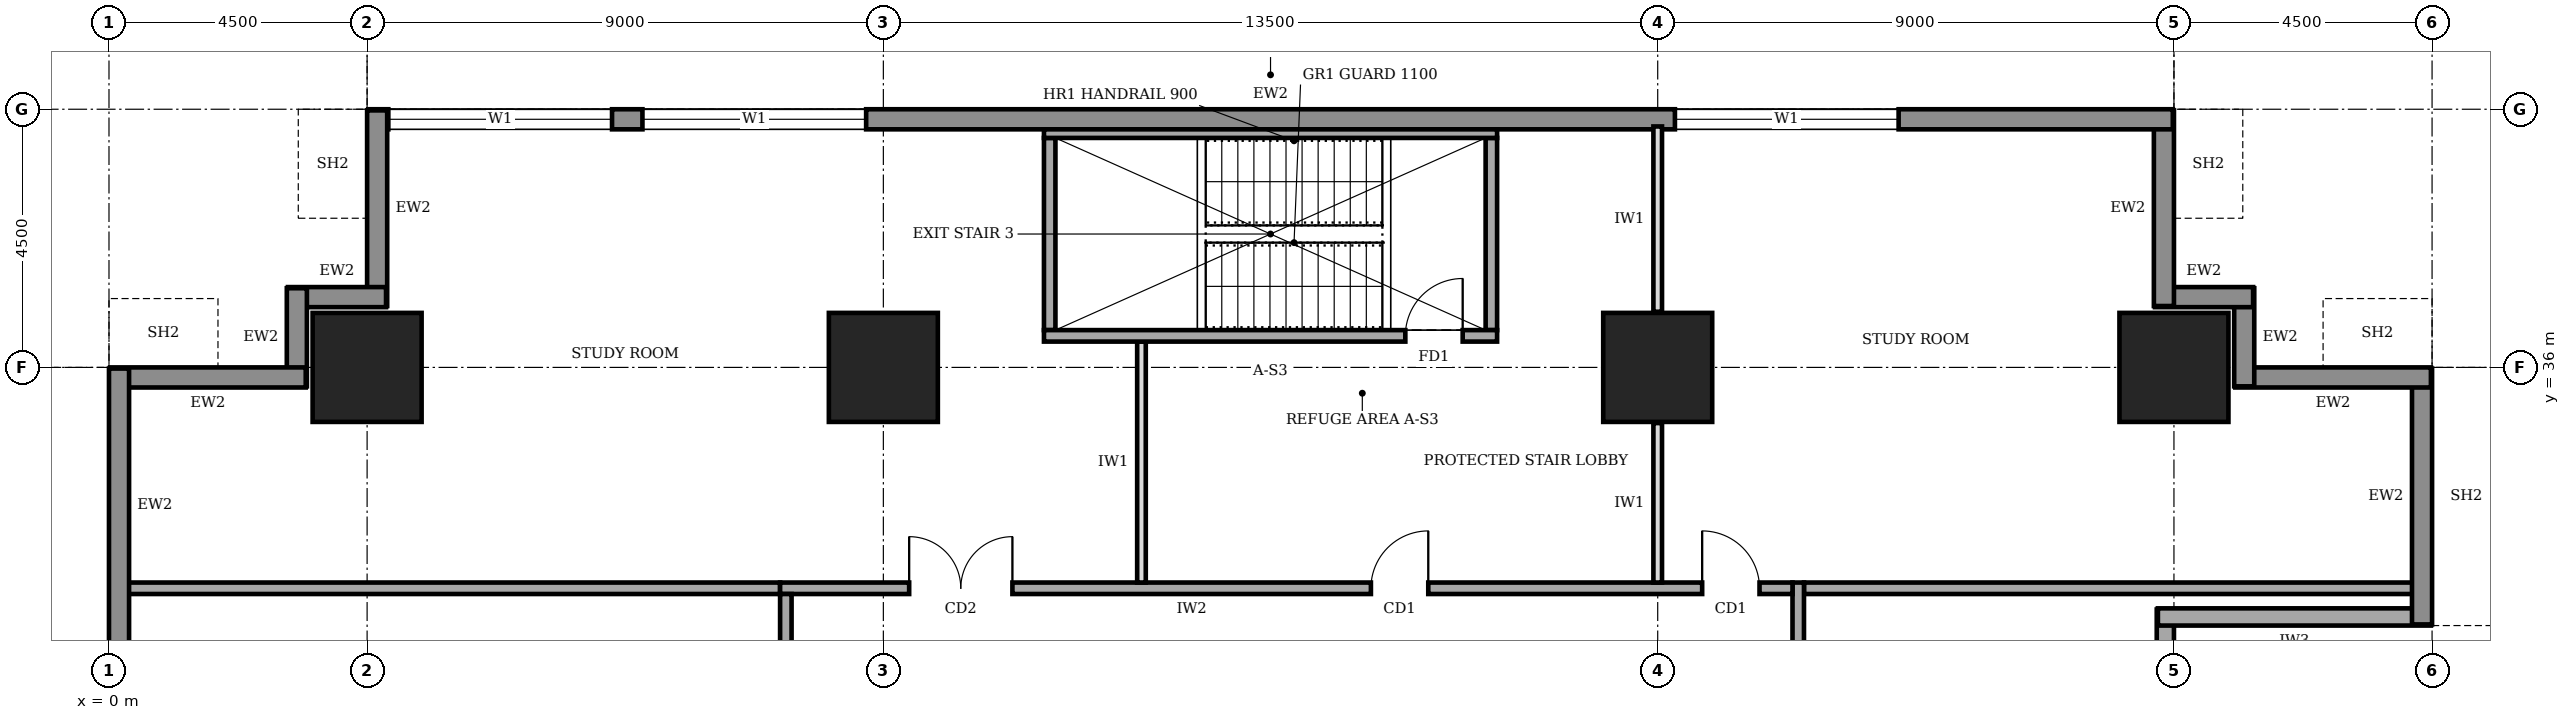
"""IFC4 building model, lengths in metres.
Left out: names, types, materials, properties, quantities, classifications, styles, units other than length and angle.
Written with IfcOpenShell. Run it as: python <this file> out.ifc"""

import sys

from ifc_helpers import new_model, si_unit, direction, frame, frame_2d, origin, origin_2d, place, context, subcontext, project, spatial, rectangle, extrude, element, fill, save


model = new_model("IFC4")
c1 = context("Model", 3, precision=1e-05, world=origin(), true_north=direction((0.0, 1.0)))
c2 = subcontext(c1, "Body", "Model", "MODEL_VIEW")
j1 = project(units=[si_unit("LENGTHUNIT", "METRE"), si_unit("PLANEANGLEUNIT", "RADIAN")], contexts=[c1])
p1 = place(None, origin())
s1 = spatial("IfcSite", under=j1, at=p1, CompositionType="ELEMENT")
p2 = place(p1, origin())
s2 = spatial("IfcBuilding", under=s1, at=p2, CompositionType="ELEMENT")
p3 = place(p2, frame((0.0, 0.0, 121.0)))
s3 = spatial("IfcBuildingStorey", under=s2, at=p3, CompositionType="ELEMENT", Elevation=121.0)
for number, where, z_axis, x_axis in (
    (1, (4.5, 36.0, 0.0), (0.0, 0.0, 1.0), (1.0, 0.0, 0.0)),
    (2, (13.5, 36.0, 0.0), (0.0, 0.0, 1.0), (1.0, 0.0, 0.0)),
    (3, (27.0, 36.0, 0.0), (0.0, 0.0, 1.0), (1.0, 0.0, 0.0)),
    (4, (36.0, 36.0, 0.0), (0.0, 0.0, 1.0), (1.0, 0.0, 0.0)),
):
    element("IfcColumn", number, at=place(p3, frame(where, z_axis=z_axis, x_axis=x_axis)), inside=s3, PredefinedType="COLUMN", context=c2, shape_type="SweptSolid", body=[
        extrude(rectangle(XDim=1.9, YDim=1.9, at=origin_2d()), origin(), (0.0, 0.0, 1.0), 4.0),
    ])
p4 = place(p3, frame((35.85, 30.4, 0.0), z_axis=(0.0, 0.0, 1.0), x_axis=(0.0, 1.0, 0.0)))
e5 = element("IfcWall", 5, at=p4, inside=s3, PredefinedType="SOLIDWALL", context=c2, shape_type="SweptSolid", body=[
    extrude(rectangle(XDim=1.38, YDim=0.3, at=frame_2d((0.69, 0.0))), origin(), (0.0, 0.0, 1.0), 2.65),
])
p5 = place(p3, frame((35.72, 31.65, 0.0), z_axis=(0.0, 0.0, 1.0), x_axis=(1.0, 0.0, 0.0)))
e6 = element("IfcWall", 6, at=p5, inside=s3, PredefinedType="SOLIDWALL", context=c2, shape_type="SweptSolid", body=[
    extrude(rectangle(XDim=4.76, YDim=0.3, at=frame_2d((2.38, 0.0))), origin(), (0.0, 0.0, 1.0), 3.75),
])
p6 = place(p3, frame((40.325, 31.52, 0.0), z_axis=(0.0, 0.0, 1.0), x_axis=(0.0, 1.0, 0.0)))
e7 = element("IfcWall", 7, at=p6, inside=s3, PredefinedType="STANDARD", context=c2, shape_type="SweptSolid", body=[
    extrude(rectangle(XDim=4.46, YDim=0.35, at=frame_2d((2.23, 0.0))), origin(), (0.0, 0.0, 1.0), 3.75),
])
p7 = place(p3, frame((40.48, 35.825, 0.0), z_axis=(0.0, 0.0, 1.0), x_axis=(-1.0, 0.0, 0.0)))
e8 = element("IfcWall", 8, at=p7, inside=s3, PredefinedType="STANDARD", context=c2, shape_type="SweptSolid", body=[
    extrude(rectangle(XDim=3.41, YDim=0.35, at=frame_2d((1.705, 0.0))), origin(), (0.0, 0.0, 1.0), 2.85),
])
for number, where, z_axis, x_axis in (
    (9, (37.225, 35.67, 0.0), (0.0, 0.0, 1.0), (0.0, 1.0, 0.0)),
    (10, (37.38, 37.225, 0.0), (0.0, 0.0, 1.0), (-1.0, 0.0, 0.0)),
):
    element("IfcWall", number, at=place(p3, frame(where, z_axis=z_axis, x_axis=x_axis)), inside=s3, PredefinedType="STANDARD", context=c2, shape_type="SweptSolid", body=[
        extrude(rectangle(XDim=1.71, YDim=0.35, at=frame_2d((0.855, 0.0))), origin(), (0.0, 0.0, 1.0), 3.75),
    ])
p8 = place(p3, frame((35.825, 37.07, 0.0), z_axis=(0.0, 0.0, 1.0), x_axis=(0.0, 1.0, 0.0)))
e11 = element("IfcWall", 11, at=p8, inside=s3, PredefinedType="STANDARD", context=c2, shape_type="SweptSolid", body=[
    extrude(rectangle(XDim=3.41, YDim=0.35, at=frame_2d((1.705, 0.0))), origin(), (0.0, 0.0, 1.0), 2.85),
])
p9 = place(p3, frame((35.98, 40.325, 0.0), z_axis=(0.0, 0.0, 1.0), x_axis=(-1.0, 0.0, 0.0)))
e12 = element("IfcWall", 12, at=p9, inside=s3, PredefinedType="STANDARD", context=c2, shape_type="SweptSolid", body=[
    extrude(rectangle(XDim=31.46, YDim=0.35, at=frame_2d((15.73, 0.0))), origin(), (0.0, 0.0, 1.0), 3.75),
])
p10 = place(p9, frame((27.21, 0.0, 0.9)))
e13 = element("IfcOpeningElement", 13, at=p10, cuts=e12, PredefinedType="OPENING", context=c2, shape_type="SweptSolid", body=[
    extrude(rectangle(XDim=3.9, YDim=2.2, at=frame_2d((1.95, 1.1))), frame((0.0, 0.185, 0.0), z_axis=(0.0, -1.0, 0.0), x_axis=(1.0, 0.0, 0.0)), (0.0, 0.0, 1.0), 0.37),
])
p11 = place(p9, frame((22.78, 0.0, 0.9)))
e14 = element("IfcOpeningElement", 14, at=p11, cuts=e12, PredefinedType="OPENING", context=c2, shape_type="SweptSolid", body=[
    extrude(rectangle(XDim=3.9, YDim=2.2, at=frame_2d((1.95, 1.1))), frame((0.0, 0.185, 0.0), z_axis=(0.0, -1.0, 0.0), x_axis=(1.0, 0.0, 0.0)), (0.0, 0.0, 1.0), 0.37),
])
p12 = place(p9, frame((4.78, 0.0, 0.9)))
e15 = element("IfcOpeningElement", 15, at=p12, cuts=e12, PredefinedType="OPENING", context=c2, shape_type="SweptSolid", body=[
    extrude(rectangle(XDim=3.9, YDim=2.2, at=frame_2d((1.95, 1.1))), frame((0.0, 0.185, 0.0), z_axis=(0.0, -1.0, 0.0), x_axis=(1.0, 0.0, 0.0)), (0.0, 0.0, 1.0), 0.37),
])
p13 = place(p3, frame((4.675, 40.48, 0.0), z_axis=(0.0, 0.0, 1.0), x_axis=(0.0, -1.0, 0.0)))
e16 = element("IfcWall", 16, at=p13, inside=s3, PredefinedType="STANDARD", context=c2, shape_type="SweptSolid", body=[
    extrude(rectangle(XDim=3.41, YDim=0.35, at=frame_2d((1.705, 0.0))), origin(), (0.0, 0.0, 1.0), 2.85),
])
for number, where, z_axis, x_axis in (
    (17, (4.83, 37.225, 0.0), (0.0, 0.0, 1.0), (-1.0, 0.0, 0.0)),
    (18, (3.275, 37.38, 0.0), (0.0, 0.0, 1.0), (0.0, -1.0, 0.0)),
):
    element("IfcWall", number, at=place(p3, frame(where, z_axis=z_axis, x_axis=x_axis)), inside=s3, PredefinedType="STANDARD", context=c2, shape_type="SweptSolid", body=[
        extrude(rectangle(XDim=1.71, YDim=0.35, at=frame_2d((0.855, 0.0))), origin(), (0.0, 0.0, 1.0), 3.75),
    ])
p14 = place(p3, frame((3.43, 35.825, 0.0), z_axis=(0.0, 0.0, 1.0), x_axis=(-1.0, 0.0, 0.0)))
e19 = element("IfcWall", 19, at=p14, inside=s3, PredefinedType="STANDARD", context=c2, shape_type="SweptSolid", body=[
    extrude(rectangle(XDim=3.41, YDim=0.35, at=frame_2d((1.705, 0.0))), origin(), (0.0, 0.0, 1.0), 2.85),
])
p15 = place(p3, frame((0.175, 35.98, 0.0), z_axis=(0.0, 0.0, 1.0), x_axis=(0.0, -1.0, 0.0)))
e20 = element("IfcWall", 20, at=p15, inside=s3, PredefinedType="STANDARD", context=c2, shape_type="SweptSolid", body=[
    extrude(rectangle(XDim=31.46, YDim=0.35, at=frame_2d((15.73, 0.0))), origin(), (0.0, 0.0, 1.0), 3.75),
])
p16 = place(p15, frame((27.21, 0.0, 0.9)))
e21 = element("IfcOpeningElement", 21, at=p16, cuts=e20, PredefinedType="OPENING", context=c2, shape_type="SweptSolid", body=[
    extrude(rectangle(XDim=3.9, YDim=2.2, at=frame_2d((1.95, 1.1))), frame((0.0, 0.185, 0.0), z_axis=(0.0, -1.0, 0.0), x_axis=(1.0, 0.0, 0.0)), (0.0, 0.0, 1.0), 0.37),
])
p17 = place(p15, frame((22.78, 0.0, 0.9)))
e22 = element("IfcOpeningElement", 22, at=p17, cuts=e20, PredefinedType="OPENING", context=c2, shape_type="SweptSolid", body=[
    extrude(rectangle(XDim=3.9, YDim=2.2, at=frame_2d((1.95, 1.1))), frame((0.0, 0.185, 0.0), z_axis=(0.0, -1.0, 0.0), x_axis=(1.0, 0.0, 0.0)), (0.0, 0.0, 1.0), 0.37),
])
p18 = place(p15, frame((18.28, 0.0, 0.9)))
e23 = element("IfcOpeningElement", 23, at=p18, cuts=e20, PredefinedType="OPENING", context=c2, shape_type="SweptSolid", body=[
    extrude(rectangle(XDim=3.9, YDim=2.2, at=frame_2d((1.95, 1.1))), frame((0.0, 0.185, 0.0), z_axis=(0.0, -1.0, 0.0), x_axis=(1.0, 0.0, 0.0)), (0.0, 0.0, 1.0), 0.37),
])
p19 = place(p15, frame((13.78, 0.0, 0.9)))
e24 = element("IfcOpeningElement", 24, at=p19, cuts=e20, PredefinedType="OPENING", context=c2, shape_type="SweptSolid", body=[
    extrude(rectangle(XDim=3.9, YDim=2.2, at=frame_2d((1.95, 1.1))), frame((0.0, 0.185, 0.0), z_axis=(0.0, -1.0, 0.0), x_axis=(1.0, 0.0, 0.0)), (0.0, 0.0, 1.0), 0.37),
])
p20 = place(p15, frame((9.28, 0.0, 0.9)))
e25 = element("IfcOpeningElement", 25, at=p20, cuts=e20, PredefinedType="OPENING", context=c2, shape_type="SweptSolid", body=[
    extrude(rectangle(XDim=3.9, YDim=2.2, at=frame_2d((1.95, 1.1))), frame((0.0, 0.185, 0.0), z_axis=(0.0, -1.0, 0.0), x_axis=(1.0, 0.0, 0.0)), (0.0, 0.0, 1.0), 0.37),
])
p21 = place(p15, frame((4.78, 0.0, 0.9)))
e26 = element("IfcOpeningElement", 26, at=p21, cuts=e20, PredefinedType="OPENING", context=c2, shape_type="SweptSolid", body=[
    extrude(rectangle(XDim=3.9, YDim=2.2, at=frame_2d((1.95, 1.1))), frame((0.0, 0.185, 0.0), z_axis=(0.0, -1.0, 0.0), x_axis=(1.0, 0.0, 0.0)), (0.0, 0.0, 1.0), 0.37),
])
p22 = place(p3, frame((29.45, 9.2, 0.0), z_axis=(0.0, 0.0, 1.0), x_axis=(0.0, 1.0, 0.0)))
e27 = element("IfcWall", 27, at=p22, inside=s3, PredefinedType="SOLIDWALL", context=c2, shape_type="SweptSolid", body=[
    extrude(rectangle(XDim=23.05, YDim=0.2, at=frame_2d((11.525, 0.0))), origin(), (0.0, 0.0, 1.0), 3.75),
])
p23 = place(p22, frame((10.525, 0.0, 0.0)))
e28 = element("IfcOpeningElement", 28, at=p23, cuts=e27, PredefinedType="OPENING", context=c2, shape_type="SweptSolid", body=[
    extrude(rectangle(XDim=1.8, YDim=2.1, at=frame_2d((0.9, 1.05))), frame((0.0, 0.11, 0.0), z_axis=(0.0, -1.0, 0.0), x_axis=(1.0, 0.0, 0.0)), (0.0, 0.0, 1.0), 0.22),
])
p24 = place(p3, frame((29.35, 32.15, 0.0), z_axis=(0.0, 0.0, 1.0), x_axis=(-1.0, 0.0, 0.0)))
e29 = element("IfcWall", 29, at=p24, inside=s3, PredefinedType="SOLIDWALL", context=c2, shape_type="SweptSolid", body=[
    extrude(rectangle(XDim=17.65, YDim=0.2, at=frame_2d((8.825, 0.0))), origin(), (0.0, 0.0, 1.0), 3.75),
])
p25 = place(p24, frame((13.6, 0.0, 0.0)))
e30 = element("IfcOpeningElement", 30, at=p25, cuts=e29, PredefinedType="OPENING", context=c2, shape_type="SweptSolid", body=[
    extrude(rectangle(XDim=1.8, YDim=2.1, at=frame_2d((0.9, 1.05))), frame((0.0, 0.11, 0.0), z_axis=(0.0, -1.0, 0.0), x_axis=(1.0, 0.0, 0.0)), (0.0, 0.0, 1.0), 0.22),
])
p26 = place(p24, frame((6.35, 0.0, 0.0)))
e31 = element("IfcOpeningElement", 31, at=p26, cuts=e29, PredefinedType="OPENING", context=c2, shape_type="SweptSolid", body=[
    extrude(rectangle(XDim=1.0, YDim=2.1, at=frame_2d((0.5, 1.05))), frame((0.0, 0.11, 0.0), z_axis=(0.0, -1.0, 0.0), x_axis=(1.0, 0.0, 0.0)), (0.0, 0.0, 1.0), 0.22),
])
p27 = place(p24, frame((0.575, 0.0, 0.0)))
e32 = element("IfcOpeningElement", 32, at=p27, cuts=e29, PredefinedType="OPENING", context=c2, shape_type="SweptSolid", body=[
    extrude(rectangle(XDim=1.0, YDim=2.1, at=frame_2d((0.5, 1.05))), frame((0.0, 0.11, 0.0), z_axis=(0.0, -1.0, 0.0), x_axis=(1.0, 0.0, 0.0)), (0.0, 0.0, 1.0), 0.22),
])
p28 = place(p3, frame((11.8, 32.05, 0.0), z_axis=(0.0, 0.0, 1.0), x_axis=(0.0, -1.0, 0.0)))
e33 = element("IfcWall", 33, at=p28, inside=s3, PredefinedType="SOLIDWALL", context=c2, shape_type="SweptSolid", body=[
    extrude(rectangle(XDim=23.05, YDim=0.2, at=frame_2d((11.525, 0.0))), origin(), (0.0, 0.0, 1.0), 3.75),
])
p29 = place(p28, frame((20.3, 0.0, 0.0)))
e34 = element("IfcOpeningElement", 34, at=p29, cuts=e33, PredefinedType="OPENING", context=c2, shape_type="SweptSolid", body=[
    extrude(rectangle(XDim=1.0, YDim=2.1, at=frame_2d((0.5, 1.05))), frame((0.0, 0.11, 0.0), z_axis=(0.0, -1.0, 0.0), x_axis=(1.0, 0.0, 0.0)), (0.0, 0.0, 1.0), 0.22),
])
p30 = place(p28, frame((16.4, 0.0, 0.0)))
e35 = element("IfcOpeningElement", 35, at=p30, cuts=e33, PredefinedType="OPENING", context=c2, shape_type="SweptSolid", body=[
    extrude(rectangle(XDim=0.9, YDim=2.1, at=frame_2d((0.45, 1.05))), frame((0.0, 0.11, 0.0), z_axis=(0.0, -1.0, 0.0), x_axis=(1.0, 0.0, 0.0)), (0.0, 0.0, 1.0), 0.22),
])
p31 = place(p28, frame((11.6, 0.0, 0.0)))
e36 = element("IfcOpeningElement", 36, at=p31, cuts=e33, PredefinedType="OPENING", context=c2, shape_type="SweptSolid", body=[
    extrude(rectangle(XDim=0.9, YDim=2.1, at=frame_2d((0.45, 1.05))), frame((0.0, 0.11, 0.0), z_axis=(0.0, -1.0, 0.0), x_axis=(1.0, 0.0, 0.0)), (0.0, 0.0, 1.0), 0.22),
])
p32 = place(p28, frame((8.55, 0.0, 0.0)))
e37 = element("IfcOpeningElement", 37, at=p32, cuts=e33, PredefinedType="OPENING", context=c2, shape_type="SweptSolid", body=[
    extrude(rectangle(XDim=0.9, YDim=2.1, at=frame_2d((0.45, 1.05))), frame((0.0, 0.11, 0.0), z_axis=(0.0, -1.0, 0.0), x_axis=(1.0, 0.0, 0.0)), (0.0, 0.0, 1.0), 0.22),
])
p33 = place(p28, frame((5.55, 0.0, 0.0)))
e38 = element("IfcOpeningElement", 38, at=p33, cuts=e33, PredefinedType="OPENING", context=c2, shape_type="SweptSolid", body=[
    extrude(rectangle(XDim=1.0, YDim=2.1, at=frame_2d((0.5, 1.05))), frame((0.0, 0.11, 0.0), z_axis=(0.0, -1.0, 0.0), x_axis=(1.0, 0.0, 0.0)), (0.0, 0.0, 1.0), 0.22),
])
p34 = place(p28, frame((13.65, 0.0, 0.0)))
e39 = element("IfcOpeningElement", 39, at=p34, cuts=e33, PredefinedType="OPENING", context=c2, shape_type="SweptSolid", body=[
    extrude(rectangle(XDim=1.0, YDim=2.1, at=frame_2d((0.5, 1.05))), frame((0.0, 0.11, 0.0), z_axis=(0.0, -1.0, 0.0), x_axis=(1.0, 0.0, 0.0)), (0.0, 0.0, 1.0), 0.22),
])
p35 = place(p28, frame((1.925, 0.0, 0.0)))
e40 = element("IfcOpeningElement", 40, at=p35, cuts=e33, PredefinedType="OPENING", context=c2, shape_type="SweptSolid", body=[
    extrude(rectangle(XDim=1.0, YDim=2.1, at=frame_2d((0.5, 1.05))), frame((0.0, 0.11, 0.0), z_axis=(0.0, -1.0, 0.0), x_axis=(1.0, 0.0, 0.0)), (0.0, 0.0, 1.0), 0.22),
])
p36 = place(p3, frame((0.3, 32.15, 0.0), z_axis=(0.0, 0.0, 1.0), x_axis=(1.0, 0.0, 0.0)))
e41 = element("IfcWall", 41, at=p36, inside=s3, PredefinedType="SOLIDWALL", context=c2, shape_type="SweptSolid", body=[
    extrude(rectangle(XDim=11.4, YDim=0.2, at=frame_2d((5.7, 0.0))), origin(), (0.0, 0.0, 1.0), 3.75),
])
p37 = place(p3, frame((29.55, 32.15, 0.0), z_axis=(0.0, 0.0, 1.0), x_axis=(1.0, 0.0, 0.0)))
e42 = element("IfcWall", 42, at=p37, inside=s3, PredefinedType="SOLIDWALL", context=c2, shape_type="SweptSolid", body=[
    extrude(rectangle(XDim=10.65, YDim=0.2, at=frame_2d((5.325, 0.0))), origin(), (0.0, 0.0, 1.0), 3.75),
])
p38 = place(p3, frame((18.0, 32.25, 0.0), z_axis=(0.0, 0.0, 1.0), x_axis=(0.0, 1.0, 0.0)))
e43 = element("IfcWall", 43, at=p38, inside=s3, PredefinedType="PARTITIONING", context=c2, shape_type="SweptSolid", body=[
    extrude(rectangle(XDim=4.2, YDim=0.15, at=frame_2d((2.1, 0.0))), origin(), (0.0, 0.0, 1.0), 3.75),
])
p39 = place(p3, frame((27.0, 32.25, 0.0), z_axis=(0.0, 0.0, 1.0), x_axis=(0.0, 1.0, 0.0)))
e44 = element("IfcWall", 44, at=p39, inside=s3, PredefinedType="PARTITIONING", context=c2, shape_type="SweptSolid", body=[
    extrude(rectangle(XDim=2.78, YDim=0.15, at=frame_2d((1.39, 0.0))), origin(), (0.0, 0.0, 1.0), 2.85),
])
p40 = place(p3, frame((27.0, 36.97, 0.0), z_axis=(0.0, 0.0, 1.0), x_axis=(0.0, 1.0, 0.0)))
e45 = element("IfcWall", 45, at=p40, inside=s3, PredefinedType="PARTITIONING", context=c2, shape_type="SweptSolid", body=[
    extrude(rectangle(XDim=3.23, YDim=0.15, at=frame_2d((1.615, 0.0))), origin(), (0.0, 0.0, 1.0), 2.85),
])
p41 = place(p3, frame((16.3, 36.55, 0.0), z_axis=(0.0, 0.0, 1.0), x_axis=(1.0, 0.0, 0.0)))
e46 = element("IfcWall", 46, at=p41, inside=s3, PredefinedType="SOLIDWALL", context=c2, shape_type="SweptSolid", body=[
    extrude(rectangle(XDim=7.9, YDim=0.2, at=frame_2d((3.95, 0.0))), origin(), (0.0, 0.0, 1.0), 3.75),
])
p42 = place(p41, frame((6.3, 0.0, 0.0)))
e47 = element("IfcOpeningElement", 47, at=p42, cuts=e46, PredefinedType="OPENING", context=c2, shape_type="SweptSolid", body=[
    extrude(rectangle(XDim=1.0, YDim=2.1, at=frame_2d((0.5, 1.05))), frame((0.0, 0.11, 0.0), z_axis=(0.0, -1.0, 0.0), x_axis=(1.0, 0.0, 0.0)), (0.0, 0.0, 1.0), 0.22),
])
p43 = place(p3, frame((16.3, 40.075, 0.0), z_axis=(0.0, 0.0, 1.0), x_axis=(1.0, 0.0, 0.0)))
e48 = element("IfcWall", 48, at=p43, inside=s3, PredefinedType="SOLIDWALL", context=c2, shape_type="SweptSolid", body=[
    extrude(rectangle(XDim=7.9, YDim=0.15, at=frame_2d((3.95, 0.0))), origin(), (0.0, 0.0, 1.0), 3.75),
])
for number, where, z_axis, x_axis in (
    (49, (16.4, 36.65, 0.0), (0.0, 0.0, 1.0), (0.0, 1.0, 0.0)),
    (50, (24.1, 36.65, 0.0), (0.0, 0.0, 1.0), (0.0, 1.0, 0.0)),
):
    element("IfcWall", number, at=place(p3, frame(where, z_axis=z_axis, x_axis=x_axis)), inside=s3, PredefinedType="SOLIDWALL", context=c2, shape_type="SweptSolid", body=[
        extrude(rectangle(XDim=3.35, YDim=0.2, at=frame_2d((1.675, 0.0))), origin(), (0.0, 0.0, 1.0), 3.75),
    ])
p44 = place(p10, origin())
e51 = element("IfcWindow", 51, at=p44, inside=s3, PartitioningType="SINGLE_PANEL", PredefinedType="WINDOW", context=c2, shape_type="SweptSolid", body=[
    extrude(rectangle(XDim=3.9, YDim=2.2, at=frame_2d((1.95, 1.1))), frame((0.0, 0.03, 0.0), z_axis=(0.0, -1.0, 0.0), x_axis=(1.0, 0.0, 0.0)), (0.0, 0.0, 1.0), 0.06),
])
fill(e13, e51)
p45 = place(p11, origin())
e52 = element("IfcWindow", 52, at=p45, inside=s3, PartitioningType="SINGLE_PANEL", PredefinedType="WINDOW", context=c2, shape_type="SweptSolid", body=[
    extrude(rectangle(XDim=3.9, YDim=2.2, at=frame_2d((1.95, 1.1))), frame((0.0, 0.03, 0.0), z_axis=(0.0, -1.0, 0.0), x_axis=(1.0, 0.0, 0.0)), (0.0, 0.0, 1.0), 0.06),
])
fill(e14, e52)
p46 = place(p12, origin())
e53 = element("IfcWindow", 53, at=p46, inside=s3, PartitioningType="SINGLE_PANEL", PredefinedType="WINDOW", context=c2, shape_type="SweptSolid", body=[
    extrude(rectangle(XDim=3.9, YDim=2.2, at=frame_2d((1.95, 1.1))), frame((0.0, 0.03, 0.0), z_axis=(0.0, -1.0, 0.0), x_axis=(1.0, 0.0, 0.0)), (0.0, 0.0, 1.0), 0.06),
])
fill(e15, e53)
p47 = place(p25, frame((1.8, 0.0, 0.0), z_axis=(0.0, 0.0, 1.0), x_axis=(-1.0, 0.0, 0.0)))
e54 = element("IfcDoor", 54, at=p47, inside=s3, OperationType="DOUBLE_DOOR_SINGLE_SWING", PredefinedType="DOOR", context=c2, shape_type="SweptSolid", body=[
    extrude(rectangle(XDim=1.8, YDim=2.1, at=frame_2d((0.9, 1.05))), frame((0.0, 0.025, 0.0), z_axis=(0.0, -1.0, 0.0), x_axis=(1.0, 0.0, 0.0)), (0.0, 0.0, 1.0), 0.05),
])
fill(e30, e54)
p48 = place(p26, frame((1.0, 0.0, 0.0), z_axis=(0.0, 0.0, 1.0), x_axis=(-1.0, 0.0, 0.0)))
e55 = element("IfcDoor", 55, at=p48, inside=s3, OperationType="SINGLE_SWING_RIGHT", PredefinedType="DOOR", context=c2, shape_type="SweptSolid", body=[
    extrude(rectangle(XDim=1.0, YDim=2.1, at=frame_2d((0.5, 1.05))), frame((0.0, 0.025, 0.0), z_axis=(0.0, -1.0, 0.0), x_axis=(1.0, 0.0, 0.0)), (0.0, 0.0, 1.0), 0.05),
])
fill(e31, e55)
p49 = place(p27, frame((1.0, 0.0, 0.0), z_axis=(0.0, 0.0, 1.0), x_axis=(-1.0, 0.0, 0.0)))
e56 = element("IfcDoor", 56, at=p49, inside=s3, OperationType="SINGLE_SWING_LEFT", PredefinedType="DOOR", context=c2, shape_type="SweptSolid", body=[
    extrude(rectangle(XDim=1.0, YDim=2.1, at=frame_2d((0.5, 1.05))), frame((0.0, 0.025, 0.0), z_axis=(0.0, -1.0, 0.0), x_axis=(1.0, 0.0, 0.0)), (0.0, 0.0, 1.0), 0.05),
])
fill(e32, e56)
p50 = place(p42, origin())
e57 = element("IfcDoor", 57, at=p50, inside=s3, OperationType="SINGLE_SWING_RIGHT", PredefinedType="DOOR", context=c2, shape_type="SweptSolid", body=[
    extrude(rectangle(XDim=1.0, YDim=2.1, at=frame_2d((0.5, 1.05))), frame((0.0, 0.025, 0.0), z_axis=(0.0, -1.0, 0.0), x_axis=(1.0, 0.0, 0.0)), (0.0, 0.0, 1.0), 0.05),
])
fill(e47, e57)
save(model, sys.argv[1])
